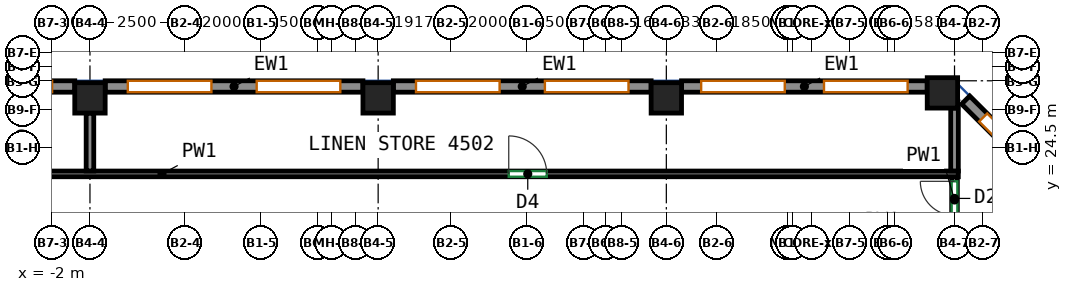
"""IFC4 building model, lengths in metres.
Left out: names, types, materials, properties, quantities, classifications, styles, units other than length and angle.
Written with IfcOpenShell. Run it as: python <this file> out.ifc"""

import sys

from ifc_helpers import new_model, si_unit, direction, frame, frame_2d, origin, origin_2d, place, context, subcontext, project, spatial, rectangle, extrude, source, transform, mapped, element, fill, save


model = new_model("IFC4")
c1 = context("Model", 3, precision=1e-05, world=origin(), true_north=direction((0.0, 1.0)))
c2 = subcontext(c1, "Body", "Model", "MODEL_VIEW")
j1 = project(units=[si_unit("LENGTHUNIT", "METRE"), si_unit("PLANEANGLEUNIT", "RADIAN")], contexts=[c1])
p1 = place(None, origin())
s1 = spatial("IfcSite", under=j1, at=p1, CompositionType="ELEMENT")
p2 = place(p1, origin())
s2 = spatial("IfcBuilding", under=s1, at=p2, CompositionType="ELEMENT")
p3 = place(p2, frame((0.0, 0.0, 188.9)))
s3 = spatial("IfcBuildingStorey", under=s2, at=p3, CompositionType="ELEMENT", Elevation=188.9)
m1 = source(origin(), c2, "Body", "SweptSolid", [
    extrude(rectangle(XDim=0.8, YDim=0.8, at=origin_2d()), origin(), (0.0, 0.0, 1.0), 3.12),
])
for number, where, z_axis, x_axis in (
    (1, (-1.0, 25.8, 0.0), (0.0, 0.0, 1.0), (1.0, 0.0, 0.0)),
    (2, (6.583, 25.8, 0.0), (0.0, 0.0, 1.0), (1.0, 0.0, 0.0)),
    (3, (14.167, 25.8, 0.0), (0.0, 0.0, 1.0), (1.0, 0.0, 0.0)),
    (4, (21.432, 25.932, 0.0), (0.0, 0.0, 1.0), (1.0, 0.0, 0.0)),
):
    element("IfcColumn", number, at=place(p3, frame(where, z_axis=z_axis, x_axis=x_axis)), inside=s3, PredefinedType="COLUMN", context=c2, shape_type="MappedRepresentation", body=[
        mapped(m1, transform((0.0, 0.0, 0.0))),
    ])
m2 = source(origin(), c2, "Body", "SweptSolid", [
    extrude(rectangle(XDim=3.5, YDim=0.3, at=frame_2d((1.75, 0.0))), origin(), (0.0, 0.0, 1.0), 3.12),
])
p4 = place(p3, frame((24.519, 23.269, 0.0), z_axis=(0.0, 0.0, 1.0), x_axis=(-0.70707190453, 0.707141656123, 0.0)))
e5 = element("IfcWall", 5, at=p4, inside=s3, PredefinedType="SOLIDWALL", context=c2, shape_type="MappedRepresentation", body=[
    mapped(m2, transform((0.0, 0.0, 0.0))),
])
p5 = place(p4, frame((0.65, 0.0, 0.85)))
e6 = element("IfcOpeningElement", 6, at=p5, cuts=e5, PredefinedType="OPENING", context=c2, shape_type="SweptSolid", body=[
    extrude(rectangle(XDim=2.2, YDim=1.95, at=frame_2d((1.1, 0.975))), frame((0.0, 0.16, 0.0), z_axis=(0.0, -1.0, 0.0), x_axis=(1.0, 0.0, 0.0)), (0.0, 0.0, 1.0), 0.32),
])
m3 = source(origin(), c2, "Body", "SweptSolid", [
    extrude(rectangle(XDim=6.465, YDim=0.3, at=frame_2d((3.232, 0.0))), origin(), (0.0, 0.0, 1.0), 3.12),
])
p6 = place(p3, frame((21.032, 26.1, 0.0), z_axis=(0.0, 0.0, 1.0), x_axis=(-1.0, 0.0, 0.0)))
e7 = element("IfcWall", 7, at=p6, inside=s3, PredefinedType="SOLIDWALL", context=c2, shape_type="MappedRepresentation", body=[
    mapped(m3, transform((0.0, 0.0, 0.0))),
])
p7 = place(p6, frame((0.516, 0.0, 0.85)))
e8 = element("IfcOpeningElement", 8, at=p7, cuts=e7, PredefinedType="OPENING", context=c2, shape_type="SweptSolid", body=[
    extrude(rectangle(XDim=2.2, YDim=1.95, at=frame_2d((1.1, 0.975))), frame((0.0, 0.16, 0.0), z_axis=(0.0, -1.0, 0.0), x_axis=(1.0, 0.0, 0.0)), (0.0, 0.0, 1.0), 0.32),
])
p8 = place(p6, frame((3.749, 0.0, 0.85)))
e9 = element("IfcOpeningElement", 9, at=p8, cuts=e7, PredefinedType="OPENING", context=c2, shape_type="SweptSolid", body=[
    extrude(rectangle(XDim=2.2, YDim=1.95, at=frame_2d((1.1, 0.975))), frame((0.0, 0.16, 0.0), z_axis=(0.0, -1.0, 0.0), x_axis=(1.0, 0.0, 0.0)), (0.0, 0.0, 1.0), 0.32),
])
m4 = source(origin(), c2, "Body", "SweptSolid", [
    extrude(rectangle(XDim=6.783, YDim=0.3, at=frame_2d((3.392, 0.0))), origin(), (0.0, 0.0, 1.0), 3.12),
])
p9 = place(p3, frame((13.767, 26.1, 0.0), z_axis=(0.0, 0.0, 1.0), x_axis=(-1.0, 0.0, 0.0)))
e10 = element("IfcWall", 10, at=p9, inside=s3, PredefinedType="SOLIDWALL", context=c2, shape_type="MappedRepresentation", body=[
    mapped(m4, transform((0.0, 0.0, 0.0))),
])
p10 = place(p9, frame((0.596, 0.0, 0.85)))
e11 = element("IfcOpeningElement", 11, at=p10, cuts=e10, PredefinedType="OPENING", context=c2, shape_type="SweptSolid", body=[
    extrude(rectangle(XDim=2.2, YDim=1.95, at=frame_2d((1.1, 0.975))), frame((0.0, 0.16, 0.0), z_axis=(0.0, -1.0, 0.0), x_axis=(1.0, 0.0, 0.0)), (0.0, 0.0, 1.0), 0.32),
])
p11 = place(p9, frame((3.988, 0.0, 0.85)))
e12 = element("IfcOpeningElement", 12, at=p11, cuts=e10, PredefinedType="OPENING", context=c2, shape_type="SweptSolid", body=[
    extrude(rectangle(XDim=2.2, YDim=1.95, at=frame_2d((1.1, 0.975))), frame((0.0, 0.16, 0.0), z_axis=(0.0, -1.0, 0.0), x_axis=(1.0, 0.0, 0.0)), (0.0, 0.0, 1.0), 0.32),
])
m5 = source(origin(), c2, "Body", "SweptSolid", [
    extrude(rectangle(XDim=6.783, YDim=0.3, at=frame_2d((3.392, 0.0))), origin(), (0.0, 0.0, 1.0), 3.12),
])
p12 = place(p3, frame((6.183, 26.1, 0.0), z_axis=(0.0, 0.0, 1.0), x_axis=(-1.0, 0.0, 0.0)))
e13 = element("IfcWall", 13, at=p12, inside=s3, PredefinedType="SOLIDWALL", context=c2, shape_type="MappedRepresentation", body=[
    mapped(m5, transform((0.0, 0.0, 0.0))),
])
p13 = place(p12, frame((0.596, 0.0, 0.85)))
e14 = element("IfcOpeningElement", 14, at=p13, cuts=e13, PredefinedType="OPENING", context=c2, shape_type="SweptSolid", body=[
    extrude(rectangle(XDim=2.2, YDim=1.95, at=frame_2d((1.1, 0.975))), frame((0.0, 0.16, 0.0), z_axis=(0.0, -1.0, 0.0), x_axis=(1.0, 0.0, 0.0)), (0.0, 0.0, 1.0), 0.32),
])
p14 = place(p12, frame((3.988, 0.0, 0.85)))
e15 = element("IfcOpeningElement", 15, at=p14, cuts=e13, PredefinedType="OPENING", context=c2, shape_type="SweptSolid", body=[
    extrude(rectangle(XDim=2.2, YDim=1.95, at=frame_2d((1.1, 0.975))), frame((0.0, 0.16, 0.0), z_axis=(0.0, -1.0, 0.0), x_axis=(1.0, 0.0, 0.0)), (0.0, 0.0, 1.0), 0.32),
])
p15 = place(p3, frame((-1.4, 26.1, 0.0), z_axis=(0.0, 0.0, 1.0), x_axis=(-1.0, 0.0, 0.0)))
e16 = element("IfcWall", 16, at=p15, inside=s3, PredefinedType="SOLIDWALL", context=c2, shape_type="MappedRepresentation", body=[
    mapped(m5, transform((0.0, 0.0, 0.0))),
])
p16 = place(p15, frame((0.596, 0.0, 0.85)))
e17 = element("IfcOpeningElement", 17, at=p16, cuts=e16, PredefinedType="OPENING", context=c2, shape_type="SweptSolid", body=[
    extrude(rectangle(XDim=2.2, YDim=1.95, at=frame_2d((1.1, 0.975))), frame((0.0, 0.16, 0.0), z_axis=(0.0, -1.0, 0.0), x_axis=(1.0, 0.0, 0.0)), (0.0, 0.0, 1.0), 0.32),
])
p17 = place(p15, frame((3.988, 0.0, 0.85)))
e18 = element("IfcOpeningElement", 18, at=p17, cuts=e16, PredefinedType="OPENING", context=c2, shape_type="SweptSolid", body=[
    extrude(rectangle(XDim=2.2, YDim=1.95, at=frame_2d((1.1, 0.975))), frame((0.0, 0.16, 0.0), z_axis=(0.0, -1.0, 0.0), x_axis=(1.0, 0.0, 0.0)), (0.0, 0.0, 1.0), 0.32),
])
p18 = place(p3, frame((21.75, 22.503, 0.0), z_axis=(0.0, 0.0, 1.0), x_axis=(0.0, 1.0, 0.0)))
e19 = element("IfcWall", 19, at=p18, inside=s3, PredefinedType="PARTITIONING", context=c2, shape_type="SweptSolid", body=[
    extrude(rectangle(XDim=1.222, YDim=0.15, at=frame_2d((0.611, 0.0))), origin(), (0.0, 0.0, 1.0), 3.12),
])
p19 = place(p18, frame((0.202, 0.0, 0.0)))
e20 = element("IfcOpeningElement", 20, at=p19, cuts=e19, PredefinedType="OPENING", context=c2, shape_type="SweptSolid", body=[
    extrude(rectangle(XDim=0.9, YDim=2.1, at=frame_2d((0.45, 1.05))), frame((0.0, 0.085, 0.0), z_axis=(0.0, -1.0, 0.0), x_axis=(1.0, 0.0, 0.0)), (0.0, 0.0, 1.0), 0.17),
])
p20 = place(p3, frame((-20.059, 23.8, 0.0), z_axis=(0.0, 0.0, 1.0), x_axis=(1.0, 0.0, 0.0)))
e21 = element("IfcWall", 21, at=p20, inside=s3, PredefinedType="PARTITIONING", context=c2, shape_type="SweptSolid", body=[
    extrude(rectangle(XDim=41.909, YDim=0.15, at=frame_2d((20.955, 0.0))), origin(), (0.0, 0.0, 1.0), 3.12),
])
p21 = place(p20, frame((4.718, 0.0, 0.0)))
e22 = element("IfcOpeningElement", 22, at=p21, cuts=e21, PredefinedType="OPENING", context=c2, shape_type="SweptSolid", body=[
    extrude(rectangle(XDim=0.9, YDim=2.1, at=frame_2d((0.45, 1.05))), frame((0.0, 0.085, 0.0), z_axis=(0.0, -1.0, 0.0), x_axis=(1.0, 0.0, 0.0)), (0.0, 0.0, 1.0), 0.17),
])
p22 = place(p20, frame((30.079, 0.0, 0.0)))
e23 = element("IfcOpeningElement", 23, at=p22, cuts=e21, PredefinedType="OPENING", context=c2, shape_type="SweptSolid", body=[
    extrude(rectangle(XDim=1.0, YDim=2.1, at=frame_2d((0.5, 1.05))), frame((0.0, 0.085, 0.0), z_axis=(0.0, -1.0, 0.0), x_axis=(1.0, 0.0, 0.0)), (0.0, 0.0, 1.0), 0.17),
])
p23 = place(p3, frame((21.75, 25.532, 0.0), z_axis=(0.0, 0.0, 1.0), x_axis=(0.0, -1.0, 0.0)))
e24 = element("IfcWall", 24, at=p23, inside=s3, PredefinedType="PARTITIONING", context=c2, shape_type="SweptSolid", body=[
    extrude(rectangle(XDim=1.655, YDim=0.2, at=frame_2d((0.828, 0.0))), origin(), (0.0, 0.0, 1.0), 3.12),
])
p24 = place(p3, frame((-1.0, 23.877, 0.0), z_axis=(0.0, 0.0, 1.0), x_axis=(0.0, 1.0, 0.0)))
e25 = element("IfcWall", 25, at=p24, inside=s3, PredefinedType="PARTITIONING", context=c2, shape_type="SweptSolid", body=[
    extrude(rectangle(XDim=1.523, YDim=0.2, at=frame_2d((0.761, 0.0))), origin(), (0.0, 0.0, 1.0), 3.12),
])
p25 = place(p5, origin())
e26 = element("IfcWindow", 26, at=p25, inside=s3, PartitioningType="SINGLE_PANEL", PredefinedType="WINDOW", context=c2, shape_type="SweptSolid", body=[
    extrude(rectangle(XDim=2.2, YDim=1.95, at=frame_2d((1.1, 0.975))), frame((0.0, 0.03, 0.0), z_axis=(0.0, -1.0, 0.0), x_axis=(1.0, 0.0, 0.0)), (0.0, 0.0, 1.0), 0.06),
])
fill(e6, e26)
p26 = place(p7, origin())
e27 = element("IfcWindow", 27, at=p26, inside=s3, PartitioningType="SINGLE_PANEL", PredefinedType="WINDOW", context=c2, shape_type="SweptSolid", body=[
    extrude(rectangle(XDim=2.2, YDim=1.95, at=frame_2d((1.1, 0.975))), frame((0.0, 0.03, 0.0), z_axis=(0.0, -1.0, 0.0), x_axis=(1.0, 0.0, 0.0)), (0.0, 0.0, 1.0), 0.06),
])
fill(e8, e27)
p27 = place(p8, origin())
e28 = element("IfcWindow", 28, at=p27, inside=s3, PartitioningType="SINGLE_PANEL", PredefinedType="WINDOW", context=c2, shape_type="SweptSolid", body=[
    extrude(rectangle(XDim=2.2, YDim=1.95, at=frame_2d((1.1, 0.975))), frame((0.0, 0.03, 0.0), z_axis=(0.0, -1.0, 0.0), x_axis=(1.0, 0.0, 0.0)), (0.0, 0.0, 1.0), 0.06),
])
fill(e9, e28)
p28 = place(p10, origin())
e29 = element("IfcWindow", 29, at=p28, inside=s3, PartitioningType="SINGLE_PANEL", PredefinedType="WINDOW", context=c2, shape_type="SweptSolid", body=[
    extrude(rectangle(XDim=2.2, YDim=1.95, at=frame_2d((1.1, 0.975))), frame((0.0, 0.03, 0.0), z_axis=(0.0, -1.0, 0.0), x_axis=(1.0, 0.0, 0.0)), (0.0, 0.0, 1.0), 0.06),
])
fill(e11, e29)
p29 = place(p11, origin())
e30 = element("IfcWindow", 30, at=p29, inside=s3, PartitioningType="SINGLE_PANEL", PredefinedType="WINDOW", context=c2, shape_type="SweptSolid", body=[
    extrude(rectangle(XDim=2.2, YDim=1.95, at=frame_2d((1.1, 0.975))), frame((0.0, 0.03, 0.0), z_axis=(0.0, -1.0, 0.0), x_axis=(1.0, 0.0, 0.0)), (0.0, 0.0, 1.0), 0.06),
])
fill(e12, e30)
p30 = place(p13, origin())
e31 = element("IfcWindow", 31, at=p30, inside=s3, PartitioningType="SINGLE_PANEL", PredefinedType="WINDOW", context=c2, shape_type="SweptSolid", body=[
    extrude(rectangle(XDim=2.2, YDim=1.95, at=frame_2d((1.1, 0.975))), frame((0.0, 0.03, 0.0), z_axis=(0.0, -1.0, 0.0), x_axis=(1.0, 0.0, 0.0)), (0.0, 0.0, 1.0), 0.06),
])
fill(e14, e31)
p31 = place(p14, origin())
e32 = element("IfcWindow", 32, at=p31, inside=s3, PartitioningType="SINGLE_PANEL", PredefinedType="WINDOW", context=c2, shape_type="SweptSolid", body=[
    extrude(rectangle(XDim=2.2, YDim=1.95, at=frame_2d((1.1, 0.975))), frame((0.0, 0.03, 0.0), z_axis=(0.0, -1.0, 0.0), x_axis=(1.0, 0.0, 0.0)), (0.0, 0.0, 1.0), 0.06),
])
fill(e15, e32)
p32 = place(p16, origin())
e33 = element("IfcWindow", 33, at=p32, inside=s3, PartitioningType="SINGLE_PANEL", PredefinedType="WINDOW", context=c2, shape_type="SweptSolid", body=[
    extrude(rectangle(XDim=2.2, YDim=1.95, at=frame_2d((1.1, 0.975))), frame((0.0, 0.03, 0.0), z_axis=(0.0, -1.0, 0.0), x_axis=(1.0, 0.0, 0.0)), (0.0, 0.0, 1.0), 0.06),
])
fill(e17, e33)
p33 = place(p19, origin())
e34 = element("IfcDoor", 34, at=p33, inside=s3, OperationType="SINGLE_SWING_RIGHT", PredefinedType="DOOR", context=c2, shape_type="SweptSolid", body=[
    extrude(rectangle(XDim=0.9, YDim=2.1, at=frame_2d((0.45, 1.05))), frame((0.0, 0.025, 0.0), z_axis=(0.0, -1.0, 0.0), x_axis=(1.0, 0.0, 0.0)), (0.0, 0.0, 1.0), 0.05),
])
fill(e20, e34)
p34 = place(p22, origin())
e35 = element("IfcDoor", 35, at=p34, inside=s3, OperationType="SINGLE_SWING_LEFT", PredefinedType="DOOR", context=c2, shape_type="SweptSolid", body=[
    extrude(rectangle(XDim=1.0, YDim=2.1, at=frame_2d((0.5, 1.05))), frame((0.0, 0.025, 0.0), z_axis=(0.0, -1.0, 0.0), x_axis=(1.0, 0.0, 0.0)), (0.0, 0.0, 1.0), 0.05),
])
fill(e23, e35)
save(model, sys.argv[1])
